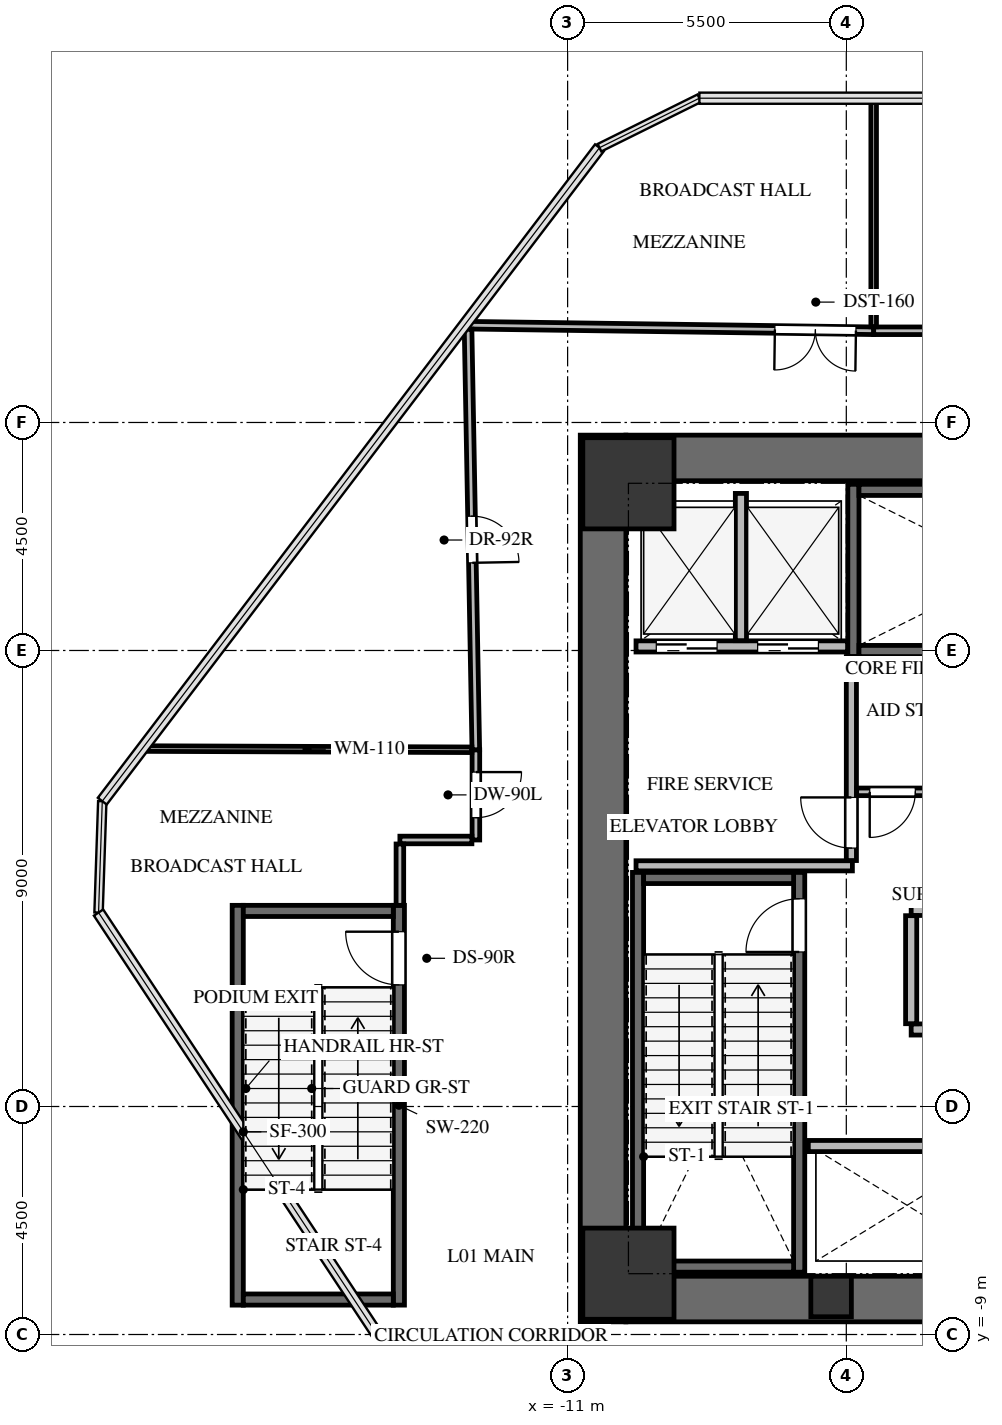
"""IFC4 building model, lengths in metres.
Left out: names, types, materials, properties, quantities, classifications, styles, units other than length and angle.
Written with IfcOpenShell. Run it as: python <this file> out.ifc"""

import sys

from ifc_helpers import new_model, si_unit, direction, frame, frame_2d, origin, origin_2d, place, context, subcontext, project, spatial, rectangle, extrude, source, transform, mapped, element, fill, save


model = new_model("IFC4")
c1 = context("Model", 3, precision=1e-05, world=origin(), true_north=direction((0.0, 1.0)))
c2 = subcontext(c1, "Body", "Model", "MODEL_VIEW")
j1 = project(units=[si_unit("LENGTHUNIT", "METRE"), si_unit("PLANEANGLEUNIT", "RADIAN")], contexts=[c1])
p1 = place(None, origin())
s1 = spatial("IfcSite", under=j1, at=p1, CompositionType="ELEMENT")
p2 = place(p1, origin())
s2 = spatial("IfcBuilding", under=s1, at=p2, CompositionType="ELEMENT")
p3 = place(p2, frame((0.0, 0.0, 5.2)))
s3 = spatial("IfcBuildingStorey", under=s2, at=p3, CompositionType="ELEMENT", Elevation=5.2)
p4 = place(p3, frame((-10.3, -8.75, 0.0), z_axis=(0.0, 0.0, 1.0), x_axis=(0.0, 1.0, 0.0)))
e1 = element("IfcWall", 1, at=p4, inside=s3, PredefinedType="SHEAR", context=c2, shape_type="SweptSolid", body=[
    extrude(rectangle(XDim=17.5, YDim=0.9, at=frame_2d((8.75, 0.0))), origin(), (0.0, 0.0, 1.0), 5.2),
])
p5 = place(p3, frame((-9.85, -8.3, 0.0), z_axis=(0.0, 0.0, 1.0), x_axis=(1.0, 0.0, 0.0)))
e2 = element("IfcWall", 2, at=p5, inside=s3, PredefinedType="SHEAR", context=c2, shape_type="SweptSolid", body=[
    extrude(rectangle(XDim=7.75, YDim=0.9, at=frame_2d((3.875, 0.0))), origin(), (0.0, 0.0, 1.0), 5.2),
])
p6 = place(p3, frame((-9.85, 8.3, 0.0), z_axis=(0.0, 0.0, 1.0), x_axis=(1.0, 0.0, 0.0)))
e3 = element("IfcWall", 3, at=p6, inside=s3, PredefinedType="SHEAR", context=c2, shape_type="SweptSolid", body=[
    extrude(rectangle(XDim=19.7, YDim=0.9, at=frame_2d((9.85, 0.0))), origin(), (0.0, 0.0, 1.0), 5.2),
])
p7 = place(p3, frame((-6.43, -7.77, -0.3), z_axis=(0.0, 0.0, 1.0), x_axis=(0.0, 1.0, 0.0)))
e4 = element("IfcWall", 4, at=p7, inside=s3, PredefinedType="SHEAR", context=c2, shape_type="SweptSolid", body=[
    extrude(rectangle(XDim=7.89, YDim=0.22, at=frame_2d((3.945, 0.0))), origin(), (0.0, 0.0, 1.0), 5.15),
])
p8 = place(p7, frame((6.32, 0.0, 0.0)))
e5 = element("IfcOpeningElement", 5, at=p8, cuts=e4, PredefinedType="OPENING", context=c2, shape_type="SweptSolid", body=[
    extrude(rectangle(XDim=1.05, YDim=2.15, at=frame_2d((0.525, 1.075))), frame((0.0, 0.12, 0.0), z_axis=(0.0, -1.0, 0.0), x_axis=(1.0, 0.0, 0.0)), (0.0, 0.0, 1.0), 0.24),
])
p9 = place(p3, frame((-9.61, 0.12, -0.3), z_axis=(0.0, 0.0, 1.0), x_axis=(0.0, -1.0, 0.0)))
e6 = element("IfcWall", 6, at=p9, inside=s3, PredefinedType="SHEAR", context=c2, shape_type="SweptSolid", body=[
    extrude(rectangle(XDim=7.89, YDim=0.22, at=frame_2d((3.945, 0.0))), origin(), (0.0, 0.0, 1.0), 5.15),
])
for number, where, z_axis, x_axis in (
    (7, (-9.5, -7.66, -0.3), (0.0, 0.0, 1.0), (1.0, 0.0, 0.0)),
    (8, (-6.54, 0.01, -0.3), (0.0, 0.0, 1.0), (-1.0, 0.0, 0.0)),
):
    element("IfcWall", number, at=place(p3, frame(where, z_axis=z_axis, x_axis=x_axis)), inside=s3, PredefinedType="SHEAR", context=c2, shape_type="SweptSolid", body=[
        extrude(rectangle(XDim=2.96, YDim=0.22, at=frame_2d((1.48, 0.0))), origin(), (0.0, 0.0, 1.0), 5.15),
    ])
p10 = place(p3, frame((-5.36, 7.78, -0.3), z_axis=(0.0, 0.0, 1.0), x_axis=(0.0, -1.0, 0.0)))
e9 = element("IfcWall", 9, at=p10, inside=s3, PredefinedType="SHEAR", context=c2, shape_type="SweptSolid", body=[
    extrude(rectangle(XDim=3.4, YDim=0.22, at=frame_2d((1.7, 0.0))), origin(), (0.0, 0.0, 1.0), 5.15),
])
p11 = place(p3, frame((-5.25, 4.49, -0.3), z_axis=(0.0, 0.0, 1.0), x_axis=(1.0, 0.0, 0.0)))
e10 = element("IfcWall", 10, at=p11, inside=s3, PredefinedType="SHEAR", context=c2, shape_type="SweptSolid", body=[
    extrude(rectangle(XDim=7.35, YDim=0.22, at=frame_2d((3.675, 0.0))), origin(), (0.0, 0.0, 1.0), 5.15),
])
p12 = place(p11, frame((5.85, 0.0, 0.0)))
e11 = element("IfcOpeningElement", 11, at=p12, cuts=e10, PredefinedType="OPENING", context=c2, shape_type="SweptSolid", body=[
    extrude(rectangle(XDim=1.05, YDim=2.15, at=frame_2d((0.525, 1.075))), frame((0.0, 0.12, 0.0), z_axis=(0.0, -1.0, 0.0), x_axis=(1.0, 0.0, 0.0)), (0.0, 0.0, 1.0), 0.24),
])
p13 = place(p3, frame((2.1, 7.67, -0.3), z_axis=(0.0, 0.0, 1.0), x_axis=(-1.0, 0.0, 0.0)))
e12 = element("IfcWall", 12, at=p13, inside=s3, PredefinedType="SHEAR", context=c2, shape_type="SweptSolid", body=[
    extrude(rectangle(XDim=7.35, YDim=0.22, at=frame_2d((3.675, 0.0))), origin(), (0.0, 0.0, 1.0), 5.15),
])
p14 = place(p3, frame((-14.33, -8.42, -0.3), z_axis=(0.0, 0.0, 1.0), x_axis=(0.0, 1.0, 0.0)))
e13 = element("IfcWall", 13, at=p14, inside=s3, PredefinedType="SHEAR", context=c2, shape_type="SweptSolid", body=[
    extrude(rectangle(XDim=7.89, YDim=0.22, at=frame_2d((3.945, 0.0))), origin(), (0.0, 0.0, 1.0), 5.15),
])
p15 = place(p14, frame((6.32, 0.0, 0.0)))
e14 = element("IfcOpeningElement", 14, at=p15, cuts=e13, PredefinedType="OPENING", context=c2, shape_type="SweptSolid", body=[
    extrude(rectangle(XDim=1.05, YDim=2.15, at=frame_2d((0.525, 1.075))), frame((0.0, 0.12, 0.0), z_axis=(0.0, -1.0, 0.0), x_axis=(1.0, 0.0, 0.0)), (0.0, 0.0, 1.0), 0.24),
])
p16 = place(p3, frame((-17.51, -0.53, -0.3), z_axis=(0.0, 0.0, 1.0), x_axis=(0.0, -1.0, 0.0)))
e15 = element("IfcWall", 15, at=p16, inside=s3, PredefinedType="SHEAR", context=c2, shape_type="SweptSolid", body=[
    extrude(rectangle(XDim=7.89, YDim=0.22, at=frame_2d((3.945, 0.0))), origin(), (0.0, 0.0, 1.0), 5.15),
])
for number, where, z_axis, x_axis in (
    (16, (-17.4, -8.31, -0.3), (0.0, 0.0, 1.0), (1.0, 0.0, 0.0)),
    (17, (-14.44, -0.64, -0.3), (0.0, 0.0, 1.0), (-1.0, 0.0, 0.0)),
):
    element("IfcWall", number, at=place(p3, frame(where, z_axis=z_axis, x_axis=x_axis)), inside=s3, PredefinedType="SHEAR", context=c2, shape_type="SweptSolid", body=[
        extrude(rectangle(XDim=2.96, YDim=0.22, at=frame_2d((1.48, 0.0))), origin(), (0.0, 0.0, 1.0), 5.15),
    ])
m1 = source(origin(), c2, "Body", "SweptSolid", [
    extrude(rectangle(XDim=1.8, YDim=1.8, at=origin_2d()), origin(), (0.0, 0.0, 1.0), 5.15),
])
for number, where, z_axis, x_axis in (
    (18, (-9.8, -7.8, -0.3), (0.0, 0.0, 1.0), (1.0, 0.0, 0.0)),
    (19, (-9.8, 7.8, -0.3), (0.0, 0.0, 1.0), (1.0, 0.0, 0.0)),
):
    element("IfcColumn", number, at=place(p3, frame(where, z_axis=z_axis, x_axis=x_axis)), inside=s3, PredefinedType="COLUMN", context=c2, shape_type="MappedRepresentation", body=[
        mapped(m1, transform((0.0, 0.0, 0.0), x_axis=(1.0, 0.0, 0.0), y_axis=(0.0, 1.0, 0.0), z_axis=(0.0, 0.0, 1.0), scale=1.0)),
    ])
m2 = source(origin(), c2, "Body", "SweptSolid", [
    extrude(rectangle(XDim=0.8, YDim=0.8, at=origin_2d()), origin(), (0.0, 0.0, 1.0), 5.15),
])
p17 = place(p3, frame((-5.8, -8.25, -0.3), z_axis=(0.0, 0.0, 1.0), x_axis=(1.0, 0.0, 0.0)))
e20 = element("IfcColumn", 20, at=p17, inside=s3, PredefinedType="PILASTER", context=c2, shape_type="MappedRepresentation", body=[
    mapped(m2, transform((0.0, 0.0, 0.0), x_axis=(1.0, 0.0, 0.0), y_axis=(0.0, 1.0, 0.0), z_axis=(0.0, 0.0, 1.0), scale=1.0)),
])
p18 = place(p3, frame((-9.65, 4.58, 0.0), z_axis=(0.0, 0.0, 1.0), x_axis=(1.0, 0.0, 0.0)))
e21 = element("IfcWall", 21, at=p18, inside=s3, PredefinedType="SOLIDWALL", context=c2, shape_type="SweptSolid", body=[
    extrude(rectangle(XDim=4.175, YDim=0.22, at=frame_2d((2.087, 0.0))), origin(), (0.0, 0.0, 1.0), 4.835),
])
p19 = place(p18, frame((0.4, 0.0, 0.0)))
e22 = element("IfcOpeningElement", 22, at=p19, cuts=e21, PredefinedType="OPENING", context=c2, shape_type="SweptSolid", body=[
    extrude(rectangle(XDim=1.2, YDim=2.15, at=frame_2d((0.6, 1.075))), frame((0.0, 0.12, 0.0), z_axis=(0.0, -1.0, 0.0), x_axis=(1.0, 0.0, 0.0)), (0.0, 0.0, 1.0), 0.24),
])
p20 = place(p18, frame((2.4, 0.0, 0.0)))
e23 = element("IfcOpeningElement", 23, at=p20, cuts=e21, PredefinedType="OPENING", context=c2, shape_type="SweptSolid", body=[
    extrude(rectangle(XDim=1.2, YDim=2.15, at=frame_2d((0.6, 1.075))), frame((0.0, 0.12, 0.0), z_axis=(0.0, -1.0, 0.0), x_axis=(1.0, 0.0, 0.0)), (0.0, 0.0, 1.0), 0.24),
])
p21 = place(p3, frame((-7.58, 4.694, 0.0), z_axis=(0.0, 0.0, 1.0), x_axis=(0.0, 1.0, 0.0)))
e24 = element("IfcWall", 24, at=p21, inside=s3, PredefinedType="SOLIDWALL", context=c2, shape_type="SweptSolid", body=[
    extrude(rectangle(XDim=2.906, YDim=0.22, at=frame_2d((1.453, 0.0))), origin(), (0.0, 0.0, 1.0), 4.835),
])
p22 = place(p3, frame((-9.65, 0.25, 0.0), z_axis=(0.0, 0.0, 1.0), x_axis=(1.0, 0.0, 0.0)))
e25 = element("IfcWall", 25, at=p22, inside=s3, PredefinedType="SOLIDWALL", context=c2, shape_type="SweptSolid", body=[
    extrude(rectangle(XDim=4.27, YDim=0.2, at=frame_2d((2.135, 0.0))), origin(), (0.0, 0.0, 1.0), 4.835),
])
p23 = place(p3, frame((-5.4, 0.354, 0.0), z_axis=(0.0, 0.0, 1.0), x_axis=(0.0, 1.0, 0.0)))
e26 = element("IfcWall", 26, at=p23, inside=s3, PredefinedType="SOLIDWALL", context=c2, shape_type="SweptSolid", body=[
    extrude(rectangle(XDim=4.026, YDim=0.2, at=frame_2d((2.013, 0.0))), origin(), (0.0, 0.0, 1.0), 4.835),
])
p24 = place(p23, frame((0.246, 0.0, 0.0)))
e27 = element("IfcOpeningElement", 27, at=p24, cuts=e26, PredefinedType="OPENING", context=c2, shape_type="SweptSolid", body=[
    extrude(rectangle(XDim=1.0, YDim=2.15, at=frame_2d((0.5, 1.075))), frame((0.0, 0.11, 0.0), z_axis=(0.0, -1.0, 0.0), x_axis=(1.0, 0.0, 0.0)), (0.0, 0.0, 1.0), 0.22),
])
p25 = place(p3, frame((-6.25, -5.28, 0.0), z_axis=(0.0, 0.0, 1.0), x_axis=(1.0, 0.0, 0.0)))
e28 = element("IfcWall", 28, at=p25, inside=s3, PredefinedType="SOLIDWALL", context=c2, shape_type="SweptSolid", body=[
    extrude(rectangle(XDim=3.9, YDim=0.22, at=frame_2d((1.95, 0.0))), origin(), (0.0, 0.0, 1.0), 4.835),
])
for number, where, z_axis, x_axis in (
    (29, (-4.22, -2.98, 0.0), (0.0, 0.0, 1.0), (1.0, 0.0, 0.0)),
    (30, (-4.22, -0.62, 0.0), (0.0, 0.0, 1.0), (1.0, 0.0, 0.0)),
):
    element("IfcWall", number, at=place(p3, frame(where, z_axis=z_axis, x_axis=x_axis)), inside=s3, PredefinedType="SOLIDWALL", context=c2, shape_type="SweptSolid", body=[
        extrude(rectangle(XDim=7.24, YDim=0.22, at=frame_2d((3.62, 0.0))), origin(), (0.0, 0.0, 1.0), 4.835),
    ])
p26 = place(p3, frame((-4.22, -2.866, 0.0), z_axis=(0.0, 0.0, 1.0), x_axis=(0.0, 1.0, 0.0)))
e31 = element("IfcWall", 31, at=p26, inside=s3, PredefinedType="SOLIDWALL", context=c2, shape_type="SweptSolid", body=[
    extrude(rectangle(XDim=2.132, YDim=0.22, at=frame_2d((1.066, 0.0))), origin(), (0.0, 0.0, 1.0), 4.835),
])
p27 = place(p3, frame((-3.88, 1.71, 0.0), z_axis=(0.0, 0.0, 1.0), x_axis=(-1.0, 0.0, 0.0)))
e32 = element("IfcWall", 32, at=p27, inside=s3, PredefinedType="PARTITIONING", context=c2, shape_type="SweptSolid", body=[
    extrude(rectangle(XDim=1.416, YDim=0.15, at=frame_2d((0.708, 0.0))), origin(), (0.0, 0.0, 1.0), 4.835),
])
p28 = place(p27, frame((0.258, 0.0, 0.0)))
e33 = element("IfcOpeningElement", 33, at=p28, cuts=e32, PredefinedType="OPENING", context=c2, shape_type="SweptSolid", body=[
    extrude(rectangle(XDim=0.9, YDim=2.05, at=frame_2d((0.45, 1.025))), frame((0.0, 0.085, 0.0), z_axis=(0.0, -1.0, 0.0), x_axis=(1.0, 0.0, 0.0)), (0.0, 0.0, 1.0), 0.17),
])
p29 = place(p3, frame((-4.96, 10.81, 0.0), z_axis=(0.0, 0.0, 1.0), x_axis=(-0.999906232337, 0.01369403281, 0.0)))
e34 = element("IfcWall", 34, at=p29, inside=s3, PredefinedType="PARTITIONING", context=c2, shape_type="SweptSolid", body=[
    extrude(rectangle(XDim=8.076, YDim=0.15, at=frame_2d((4.038, 0.0))), origin(), (0.0, 0.0, 1.0), 3.757),
])
p30 = place(p29, frame((0.35, 0.0, 0.0)))
e35 = element("IfcOpeningElement", 35, at=p30, cuts=e34, PredefinedType="OPENING", context=c2, shape_type="SweptSolid", body=[
    extrude(rectangle(XDim=1.6, YDim=2.15, at=frame_2d((0.8, 1.075))), frame((0.0, 0.085, 0.0), z_axis=(0.0, -1.0, 0.0), x_axis=(1.0, 0.0, 0.0)), (0.0, 0.0, 1.0), 0.17),
])
p31 = place(p3, frame((5.04, 10.81, 0.0), z_axis=(0.0, 0.0, 1.0), x_axis=(-1.0, 0.0, 0.0)))
e36 = element("IfcWall", 36, at=p31, inside=s3, PredefinedType="PARTITIONING", context=c2, shape_type="SweptSolid", body=[
    extrude(rectangle(XDim=10.0, YDim=0.15, at=frame_2d((5.0, 0.0))), origin(), (0.0, 0.0, 1.0), 4.835),
])
p32 = place(p31, frame((4.54, 0.0, 0.0)))
e37 = element("IfcOpeningElement", 37, at=p32, cuts=e36, PredefinedType="OPENING", context=c2, shape_type="SweptSolid", body=[
    extrude(rectangle(XDim=0.92, YDim=2.1, at=frame_2d((0.46, 1.05))), frame((0.0, 0.085, 0.0), z_axis=(0.0, -1.0, 0.0), x_axis=(1.0, 0.0, 0.0)), (0.0, 0.0, 1.0), 0.17),
])
p33 = place(p3, frame((-12.81, 2.54, 0.0), z_axis=(0.0, 0.0, 1.0), x_axis=(0.0, -1.0, 0.0)))
e38 = element("IfcWall", 38, at=p33, inside=s3, PredefinedType="PARTITIONING", context=c2, shape_type="SweptSolid", body=[
    extrude(rectangle(XDim=1.78, YDim=0.15, at=frame_2d((0.89, 0.0))), origin(), (0.0, 0.0, 1.0), 3.757),
])
p34 = place(p33, frame((0.44, 0.0, 0.0)))
e39 = element("IfcOpeningElement", 39, at=p34, cuts=e38, PredefinedType="OPENING", context=c2, shape_type="SweptSolid", body=[
    extrude(rectangle(XDim=0.9, YDim=2.05, at=frame_2d((0.45, 1.025))), frame((0.0, 0.085, 0.0), z_axis=(0.0, -1.0, 0.0), x_axis=(1.0, 0.0, 0.0)), (0.0, 0.0, 1.0), 0.17),
])
p35 = place(p3, frame((-12.889, 0.76, 0.0), z_axis=(0.0, 0.0, 1.0), x_axis=(-1.0, 0.0, 0.0)))
e40 = element("IfcWall", 40, at=p35, inside=s3, PredefinedType="PARTITIONING", context=c2, shape_type="SweptSolid", body=[
    extrude(rectangle(XDim=1.421, YDim=0.15, at=frame_2d((0.71, 0.0))), origin(), (0.0, 0.0, 1.0), 4.835),
])
p36 = place(p3, frame((-14.31, 0.681, 0.0), z_axis=(0.0, 0.0, 1.0), x_axis=(0.0, -1.0, 0.0)))
e41 = element("IfcWall", 41, at=p36, inside=s3, PredefinedType="PARTITIONING", context=c2, shape_type="SweptSolid", body=[
    extrude(rectangle(XDim=1.211, YDim=0.15, at=frame_2d((0.605, 0.0))), origin(), (0.0, 0.0, 1.0), 4.835),
])
p37 = place(p3, frame((-12.965, 10.841, 0.0), z_axis=(0.0, 0.0, 1.0), x_axis=(0.01843804156, -0.999830004863, 0.0)))
e42 = element("IfcWall", 42, at=p37, inside=s3, PredefinedType="PARTITIONING", context=c2, shape_type="SweptSolid", body=[
    extrude(rectangle(XDim=8.302, YDim=0.15, at=frame_2d((4.151, 0.0))), origin(), (0.0, 0.0, 1.0), 3.757),
])
p38 = place(p37, frame((3.691, 0.0, 0.0)))
e43 = element("IfcOpeningElement", 43, at=p38, cuts=e42, PredefinedType="OPENING", context=c2, shape_type="SweptSolid", body=[
    extrude(rectangle(XDim=0.92, YDim=2.1, at=frame_2d((0.46, 1.05))), frame((0.0, 0.085, 0.0), z_axis=(0.0, -1.0, 0.0), x_axis=(1.0, 0.0, 0.0)), (0.0, 0.0, 1.0), 0.17),
])
p39 = place(p3, frame((-4.96, 15.4, 0.0), z_axis=(0.0, 0.0, 1.0), x_axis=(0.0, -1.0, 0.0)))
e44 = element("IfcWall", 44, at=p39, inside=s3, PredefinedType="MOVABLE", context=c2, shape_type="SweptSolid", body=[
    extrude(rectangle(XDim=4.511, YDim=0.11, at=frame_2d((2.255, 0.0))), origin(), (0.0, 0.0, 1.0), 4.835),
])
p40 = place(p3, frame((-19.393, 2.564, 0.0), z_axis=(0.0, 0.0, 1.0), x_axis=(0.999993231698, -0.003679206214, 0.0)))
e45 = element("IfcWall", 45, at=p40, inside=s3, PredefinedType="MOVABLE", context=c2, shape_type="SweptSolid", body=[
    extrude(rectangle(XDim=6.503, YDim=0.11, at=frame_2d((3.251, 0.0))), origin(), (0.0, 0.0, 1.0), 3.757),
])
m3 = source(origin(), c2, "Body", "SweptSolid", [
    extrude(rectangle(XDim=1.05, YDim=2.15, at=frame_2d((0.525, 1.075))), frame((0.0, 0.025, 0.0), z_axis=(0.0, -1.0, 0.0), x_axis=(1.0, 0.0, 0.0)), (0.0, 0.0, 1.0), 0.05),
])
p41 = place(p8, origin())
e46 = element("IfcDoor", 46, at=p41, inside=s3, OperationType="SINGLE_SWING_LEFT", PredefinedType="DOOR", context=c2, shape_type="MappedRepresentation", body=[
    mapped(m3, transform((0.0, 0.0, 0.0), x_axis=(1.0, 0.0, 0.0), y_axis=(0.0, 1.0, 0.0), z_axis=(0.0, 0.0, 1.0), scale=1.0)),
])
fill(e5, e46)
m4 = source(origin(), c2, "Body", "SweptSolid", [
    extrude(rectangle(XDim=1.05, YDim=2.15, at=frame_2d((0.525, 1.075))), frame((0.0, 0.025, 0.0), z_axis=(0.0, -1.0, 0.0), x_axis=(1.0, 0.0, 0.0)), (0.0, 0.0, 1.0), 0.05),
])
p42 = place(p15, origin())
e47 = element("IfcDoor", 47, at=p42, inside=s3, OperationType="SINGLE_SWING_RIGHT", PredefinedType="DOOR", context=c2, shape_type="MappedRepresentation", body=[
    mapped(m4, transform((0.0, 0.0, 0.0), x_axis=(1.0, 0.0, 0.0), y_axis=(0.0, 1.0, 0.0), z_axis=(0.0, 0.0, 1.0), scale=1.0)),
])
fill(e14, e47)
m5 = source(origin(), c2, "Body", "SweptSolid", [
    extrude(rectangle(XDim=1.2, YDim=2.15, at=frame_2d((0.6, 1.075))), frame((0.0, 0.025, 0.0), z_axis=(0.0, -1.0, 0.0), x_axis=(1.0, 0.0, 0.0)), (0.0, 0.0, 1.0), 0.05),
])
p43 = place(p19, origin())
e48 = element("IfcDoor", 48, at=p43, inside=s3, OperationType="DOUBLE_DOOR_SLIDING", PredefinedType="DOOR", context=c2, shape_type="MappedRepresentation", body=[
    mapped(m5, transform((0.0, 0.0, 0.0), x_axis=(1.0, 0.0, 0.0), y_axis=(0.0, 1.0, 0.0), z_axis=(0.0, 0.0, 1.0), scale=1.0)),
])
fill(e22, e48)
p44 = place(p20, origin())
e49 = element("IfcDoor", 49, at=p44, inside=s3, OperationType="DOUBLE_DOOR_SLIDING", PredefinedType="DOOR", context=c2, shape_type="MappedRepresentation", body=[
    mapped(m5, transform((0.0, 0.0, 0.0), x_axis=(1.0, 0.0, 0.0), y_axis=(0.0, 1.0, 0.0), z_axis=(0.0, 0.0, 1.0), scale=1.0)),
])
fill(e23, e49)
m6 = source(origin(), c2, "Body", "SweptSolid", [
    extrude(rectangle(XDim=1.0, YDim=2.15, at=frame_2d((0.5, 1.075))), frame((0.0, 0.025, 0.0), z_axis=(0.0, -1.0, 0.0), x_axis=(1.0, 0.0, 0.0)), (0.0, 0.0, 1.0), 0.05),
])
p45 = place(p24, origin())
e50 = element("IfcDoor", 50, at=p45, inside=s3, OperationType="SINGLE_SWING_RIGHT", PredefinedType="DOOR", context=c2, shape_type="MappedRepresentation", body=[
    mapped(m6, transform((0.0, 0.0, 0.0), x_axis=(1.0, 0.0, 0.0), y_axis=(0.0, 1.0, 0.0), z_axis=(0.0, 0.0, 1.0), scale=1.0)),
])
fill(e27, e50)
m7 = source(origin(), c2, "Body", "SweptSolid", [
    extrude(rectangle(XDim=0.9, YDim=2.05, at=frame_2d((0.45, 1.025))), frame((0.0, 0.025, 0.0), z_axis=(0.0, -1.0, 0.0), x_axis=(1.0, 0.0, 0.0)), (0.0, 0.0, 1.0), 0.05),
])
p46 = place(p28, origin())
e51 = element("IfcDoor", 51, at=p46, inside=s3, OperationType="SINGLE_SWING_RIGHT", PredefinedType="DOOR", context=c2, shape_type="MappedRepresentation", body=[
    mapped(m7, transform((0.0, 0.0, 0.0), x_axis=(1.0, 0.0, 0.0), y_axis=(0.0, 1.0, 0.0), z_axis=(0.0, 0.0, 1.0), scale=1.0)),
])
fill(e33, e51)
m8 = source(origin(), c2, "Body", "SweptSolid", [
    extrude(rectangle(XDim=1.6, YDim=2.15, at=frame_2d((0.8, 1.075))), frame((0.0, 0.025, 0.0), z_axis=(0.0, -1.0, 0.0), x_axis=(1.0, 0.0, 0.0)), (0.0, 0.0, 1.0), 0.05),
])
p47 = place(p30, origin())
e52 = element("IfcDoor", 52, at=p47, inside=s3, OperationType="DOUBLE_DOOR_SINGLE_SWING", PredefinedType="DOOR", context=c2, shape_type="MappedRepresentation", body=[
    mapped(m8, transform((0.0, 0.0, 0.0), x_axis=(1.0, 0.0, 0.0), y_axis=(0.0, 1.0, 0.0), z_axis=(0.0, 0.0, 1.0), scale=1.0)),
])
fill(e35, e52)
m9 = source(origin(), c2, "Body", "SweptSolid", [
    extrude(rectangle(XDim=0.9, YDim=2.05, at=frame_2d((0.45, 1.025))), frame((0.0, 0.025, 0.0), z_axis=(0.0, -1.0, 0.0), x_axis=(1.0, 0.0, 0.0)), (0.0, 0.0, 1.0), 0.05),
])
p48 = place(p34, origin())
e53 = element("IfcDoor", 53, at=p48, inside=s3, OperationType="SINGLE_SWING_LEFT", PredefinedType="DOOR", context=c2, shape_type="MappedRepresentation", body=[
    mapped(m9, transform((0.0, 0.0, 0.0), x_axis=(1.0, 0.0, 0.0), y_axis=(0.0, 1.0, 0.0), z_axis=(0.0, 0.0, 1.0), scale=1.0)),
])
fill(e39, e53)
m10 = source(origin(), c2, "Body", "SweptSolid", [
    extrude(rectangle(XDim=0.92, YDim=2.1, at=frame_2d((0.46, 1.05))), frame((0.0, 0.025, 0.0), z_axis=(0.0, -1.0, 0.0), x_axis=(1.0, 0.0, 0.0)), (0.0, 0.0, 1.0), 0.05),
])
p49 = place(p38, origin())
e54 = element("IfcDoor", 54, at=p49, inside=s3, OperationType="SINGLE_SWING_RIGHT", PredefinedType="DOOR", context=c2, shape_type="MappedRepresentation", body=[
    mapped(m10, transform((0.0, 0.0, 0.0), x_axis=(1.0, 0.0, 0.0), y_axis=(0.0, 1.0, 0.0), z_axis=(0.0, 0.0, 1.0), scale=1.0)),
])
fill(e43, e54)
save(model, sys.argv[1])
